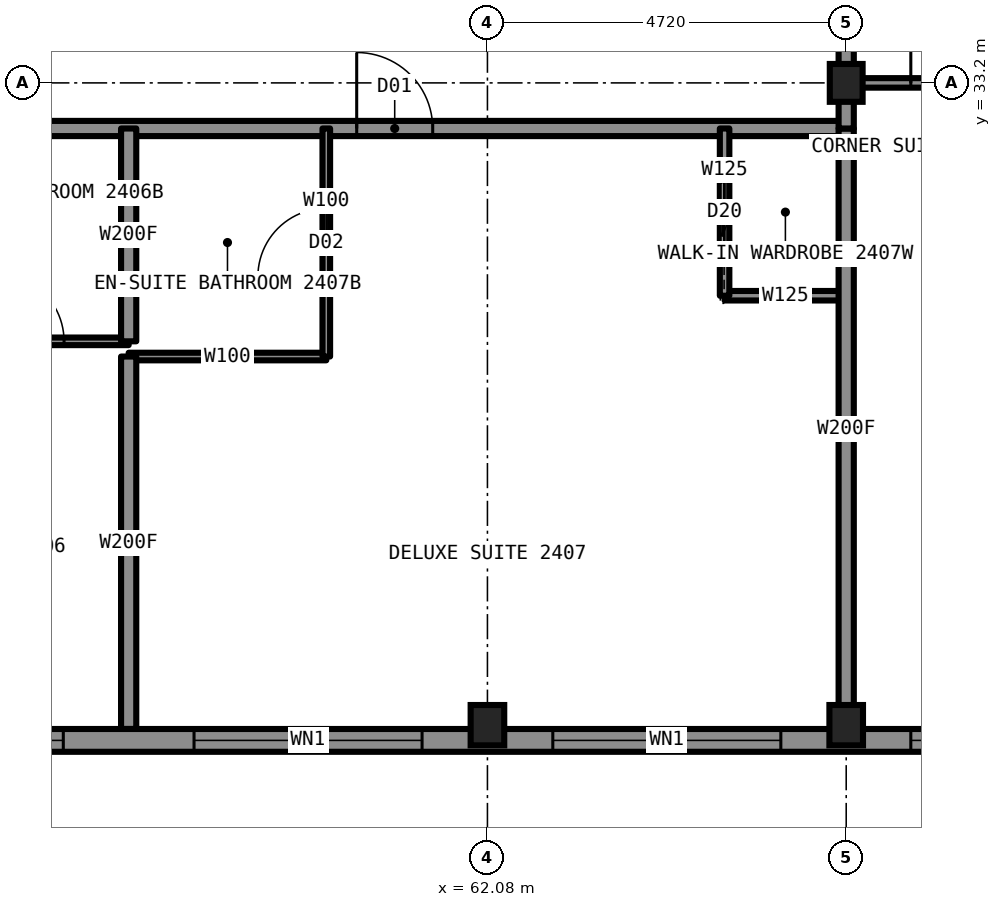
"""IFC4 building model, lengths in metres.
Left out: names, types, materials, properties, quantities, classifications, styles, units other than length and angle.
Written with IfcOpenShell. Run it as: python <this file> out.ifc"""

import sys

from ifc_helpers import new_model, si_unit, direction, frame, frame_2d, origin, origin_2d, place, context, subcontext, project, spatial, rectangle, i_section, extrude, element, fill, save


model = new_model("IFC4")
c1 = context("Model", 3, precision=1e-05, world=origin(), true_north=direction((0.0, 1.0)))
c2 = subcontext(c1, "Body", "Model", "MODEL_VIEW")
j1 = project(units=[si_unit("LENGTHUNIT", "METRE"), si_unit("PLANEANGLEUNIT", "RADIAN")], contexts=[c1])
p1 = place(None, origin())
s1 = spatial("IfcSite", under=j1, at=p1, CompositionType="ELEMENT")
p2 = place(p1, origin())
s2 = spatial("IfcBuilding", under=s1, at=p2, CompositionType="ELEMENT")
p3 = place(p2, frame((0.0, 0.0, 93.4)))
s3 = spatial("IfcBuildingStorey", under=s2, at=p3, CompositionType="ELEMENT", Elevation=93.4)
for number, where, z_axis, x_axis in (
    (1, (62.08, 24.75, 0.0), (0.0, 0.0, 1.0), (1.0, 0.0, 0.0)),
    (2, (66.8, 24.75, 0.0), (0.0, 0.0, 1.0), (1.0, 0.0, 0.0)),
):
    element("IfcColumn", number, at=place(p3, frame(where, z_axis=z_axis, x_axis=x_axis)), inside=s3, PredefinedType="COLUMN", context=c2, shape_type="SweptSolid", body=[
        extrude(i_section(OverallWidth=0.442, OverallDepth=0.531, WebThickness=0.066, FlangeThickness=0.106, at=origin_2d()), origin(), (0.0, 0.0, 1.0), 3.5),
    ])
p4 = place(p3, frame((66.8, 33.2, 0.0), z_axis=(0.0, 0.0, 1.0), x_axis=(1.0, 0.0, 0.0)))
e3 = element("IfcColumn", 3, at=p4, inside=s3, PredefinedType="COLUMN", context=c2, shape_type="SweptSolid", body=[
    extrude(i_section(OverallWidth=0.432, OverallDepth=0.498, WebThickness=0.056, FlangeThickness=0.089, at=origin_2d()), origin(), (0.0, 0.0, 1.0), 3.5),
])
p5 = place(p3, frame((66.8, 33.2, 0.0), z_axis=(0.0, 0.0, 1.0), x_axis=(1.0, 0.0, 0.0)))
e4 = element("IfcWall", 4, at=p5, inside=s3, PredefinedType="PARTITIONING", context=c2, shape_type="SweptSolid", body=[
    extrude(rectangle(XDim=8.5, YDim=0.125, at=frame_2d((4.25, 0.0))), origin(), (0.0, 0.0, 1.0), 2.573),
])
p6 = place(p5, frame((0.85, 0.0, 0.0)))
e5 = element("IfcOpeningElement", 5, at=p6, cuts=e4, PredefinedType="OPENING", context=c2, shape_type="SweptSolid", body=[
    extrude(rectangle(XDim=0.9, YDim=2.2, at=frame_2d((0.45, 1.1))), frame((0.0, 0.073, 0.0), z_axis=(0.0, -1.0, 0.0), x_axis=(1.0, 0.0, 0.0)), (0.0, 0.0, 1.0), 0.145),
])
p7 = place(p3, frame((43.2, 32.6, 0.0), z_axis=(0.0, 0.0, 1.0), x_axis=(1.0, 0.0, 0.0)))
e6 = element("IfcWall", 6, at=p7, inside=s3, PredefinedType="PARTITIONING", context=c2, shape_type="SweptSolid", body=[
    extrude(rectangle(XDim=23.6, YDim=0.2, at=frame_2d((11.8, 0.0))), origin(), (0.0, 0.0, 1.0), 3.33),
])
p8 = place(p7, frame((3.0, 0.0, 0.0)))
e7 = element("IfcOpeningElement", 7, at=p8, cuts=e6, PredefinedType="OPENING", context=c2, shape_type="SweptSolid", body=[
    extrude(rectangle(XDim=1.0, YDim=2.2, at=frame_2d((0.5, 1.1))), frame((0.0, 0.11, 0.0), z_axis=(0.0, -1.0, 0.0), x_axis=(1.0, 0.0, 0.0)), (0.0, 0.0, 1.0), 0.22),
])
p9 = place(p7, frame((9.84, 0.0, 0.0)))
e8 = element("IfcOpeningElement", 8, at=p9, cuts=e6, PredefinedType="OPENING", context=c2, shape_type="SweptSolid", body=[
    extrude(rectangle(XDim=1.0, YDim=2.2, at=frame_2d((0.5, 1.1))), frame((0.0, 0.11, 0.0), z_axis=(0.0, -1.0, 0.0), x_axis=(1.0, 0.0, 0.0)), (0.0, 0.0, 1.0), 0.22),
])
p10 = place(p7, frame((17.16, 0.0, 0.0)))
e9 = element("IfcOpeningElement", 9, at=p10, cuts=e6, PredefinedType="OPENING", context=c2, shape_type="SweptSolid", body=[
    extrude(rectangle(XDim=1.0, YDim=2.2, at=frame_2d((0.5, 1.1))), frame((0.0, 0.11, 0.0), z_axis=(0.0, -1.0, 0.0), x_axis=(1.0, 0.0, 0.0)), (0.0, 0.0, 1.0), 0.22),
])
p11 = place(p3, frame((65.2, 30.4, 0.0), z_axis=(0.0, 0.0, 1.0), x_axis=(1.0, 0.0, 0.0)))
e10 = element("IfcWall", 10, at=p11, inside=s3, PredefinedType="PARTITIONING", context=c2, shape_type="SweptSolid", body=[
    extrude(rectangle(XDim=1.6, YDim=0.125, at=frame_2d((0.8, 0.0))), origin(), (0.0, 0.0, 1.0), 3.33),
])
p12 = place(p3, frame((54.76, 29.8, 0.0), z_axis=(0.0, 0.0, 1.0), x_axis=(1.0, 0.0, 0.0)))
e11 = element("IfcWall", 11, at=p12, inside=s3, PredefinedType="PARTITIONING", context=c2, shape_type="SweptSolid", body=[
    extrude(rectangle(XDim=2.6, YDim=0.1, at=frame_2d((1.3, 0.0))), origin(), (0.0, 0.0, 1.0), 2.731),
])
p13 = place(p12, frame((0.85, 0.0, 0.0)))
e12 = element("IfcOpeningElement", 12, at=p13, cuts=e11, PredefinedType="OPENING", context=c2, shape_type="SweptSolid", body=[
    extrude(rectangle(XDim=0.9, YDim=2.1, at=frame_2d((0.45, 1.05))), frame((0.0, 0.06, 0.0), z_axis=(0.0, -1.0, 0.0), x_axis=(1.0, 0.0, 0.0)), (0.0, 0.0, 1.0), 0.12),
])
p14 = place(p3, frame((57.36, 29.6, 0.0), z_axis=(0.0, 0.0, 1.0), x_axis=(1.0, 0.0, 0.0)))
e13 = element("IfcWall", 13, at=p14, inside=s3, PredefinedType="PARTITIONING", context=c2, shape_type="SweptSolid", body=[
    extrude(rectangle(XDim=2.6, YDim=0.1, at=frame_2d((1.3, 0.0))), origin(), (0.0, 0.0, 1.0), 3.33),
])
p15 = place(p3, frame((65.2, 30.4, 0.0), z_axis=(0.0, 0.0, 1.0), x_axis=(0.0, 1.0, 0.0)))
e14 = element("IfcWall", 14, at=p15, inside=s3, PredefinedType="PARTITIONING", context=c2, shape_type="SweptSolid", body=[
    extrude(rectangle(XDim=2.2, YDim=0.125, at=frame_2d((1.1, 0.0))), origin(), (0.0, 0.0, 1.0), 3.33),
])
p16 = place(p15, frame((0.7, 0.0, 0.0)))
e15 = element("IfcOpeningElement", 15, at=p16, cuts=e14, PredefinedType="OPENING", context=c2, shape_type="SweptSolid", body=[
    extrude(rectangle(XDim=0.8, YDim=2.1, at=frame_2d((0.4, 1.05))), frame((0.0, 0.073, 0.0), z_axis=(0.0, -1.0, 0.0), x_axis=(1.0, 0.0, 0.0)), (0.0, 0.0, 1.0), 0.145),
])
p17 = place(p3, frame((66.8, 33.22, 0.0), z_axis=(0.0, 0.0, 1.0), x_axis=(0.0, 1.0, 0.0)))
e16 = element("IfcWall", 16, at=p17, inside=s3, PredefinedType="PARTITIONING", context=c2, shape_type="SweptSolid", body=[
    extrude(rectangle(XDim=23.56, YDim=0.2, at=frame_2d((11.78, 0.0))), origin(), (0.0, 0.0, 1.0), 3.33),
])
p18 = place(p17, frame((6.16, 0.0, 0.0)))
e17 = element("IfcOpeningElement", 17, at=p18, cuts=e16, PredefinedType="OPENING", context=c2, shape_type="SweptSolid", body=[
    extrude(rectangle(XDim=1.0, YDim=2.2, at=frame_2d((0.5, 1.1))), frame((0.0, 0.11, 0.0), z_axis=(0.0, -1.0, 0.0), x_axis=(1.0, 0.0, 0.0)), (0.0, 0.0, 1.0), 0.22),
])
p19 = place(p17, frame((12.42, 0.0, 0.0)))
e18 = element("IfcOpeningElement", 18, at=p19, cuts=e16, PredefinedType="OPENING", context=c2, shape_type="SweptSolid", body=[
    extrude(rectangle(XDim=1.0, YDim=2.2, at=frame_2d((0.5, 1.1))), frame((0.0, 0.11, 0.0), z_axis=(0.0, -1.0, 0.0), x_axis=(1.0, 0.0, 0.0)), (0.0, 0.0, 1.0), 0.22),
])
p20 = place(p17, frame((21.82, 0.0, 0.0)))
e19 = element("IfcOpeningElement", 19, at=p20, cuts=e16, PredefinedType="OPENING", context=c2, shape_type="SweptSolid", body=[
    extrude(rectangle(XDim=1.1, YDim=2.2, at=frame_2d((0.55, 1.1))), frame((0.0, 0.11, 0.0), z_axis=(0.0, -1.0, 0.0), x_axis=(1.0, 0.0, 0.0)), (0.0, 0.0, 1.0), 0.22),
])
p21 = place(p17, frame((0.64, 0.0, 0.0)))
e20 = element("IfcOpeningElement", 20, at=p21, cuts=e16, PredefinedType="OPENING", context=c2, shape_type="SweptSolid", body=[
    extrude(rectangle(XDim=1.1, YDim=2.2, at=frame_2d((0.55, 1.1))), frame((0.0, 0.11, 0.0), z_axis=(0.0, -1.0, 0.0), x_axis=(1.0, 0.0, 0.0)), (0.0, 0.0, 1.0), 0.22),
])
p22 = place(p3, frame((66.8, 24.7, 0.0), z_axis=(0.0, 0.0, 1.0), x_axis=(0.0, 1.0, 0.0)))
e21 = element("IfcWall", 21, at=p22, inside=s3, PredefinedType="PARTITIONING", context=c2, shape_type="SweptSolid", body=[
    extrude(rectangle(XDim=7.9, YDim=0.2, at=frame_2d((3.95, 0.0))), origin(), (0.0, 0.0, 1.0), 2.573),
])
p23 = place(p3, frame((57.36, 24.7, 0.0), z_axis=(0.0, 0.0, 1.0), x_axis=(0.0, 1.0, 0.0)))
e22 = element("IfcWall", 22, at=p23, inside=s3, PredefinedType="PARTITIONING", context=c2, shape_type="SweptSolid", body=[
    extrude(rectangle(XDim=4.9, YDim=0.2, at=frame_2d((2.45, 0.0))), origin(), (0.0, 0.0, 1.0), 3.33),
])
p24 = place(p3, frame((57.36, 29.8, 0.0), z_axis=(0.0, 0.0, 1.0), x_axis=(0.0, 1.0, 0.0)))
e23 = element("IfcWall", 23, at=p24, inside=s3, PredefinedType="PARTITIONING", context=c2, shape_type="SweptSolid", body=[
    extrude(rectangle(XDim=2.8, YDim=0.2, at=frame_2d((1.4, 0.0))), origin(), (0.0, 0.0, 1.0), 3.33),
])
p25 = place(p3, frame((59.96, 29.6, 0.0), z_axis=(0.0, 0.0, 1.0), x_axis=(0.0, 1.0, 0.0)))
e24 = element("IfcWall", 24, at=p25, inside=s3, PredefinedType="PARTITIONING", context=c2, shape_type="SweptSolid", body=[
    extrude(rectangle(XDim=3.0, YDim=0.1, at=frame_2d((1.5, 0.0))), origin(), (0.0, 0.0, 1.0), 3.33),
])
p26 = place(p25, frame((1.05, 0.0, 0.0)))
e25 = element("IfcOpeningElement", 25, at=p26, cuts=e24, PredefinedType="OPENING", context=c2, shape_type="SweptSolid", body=[
    extrude(rectangle(XDim=0.9, YDim=2.1, at=frame_2d((0.45, 1.05))), frame((0.0, 0.06, 0.0), z_axis=(0.0, -1.0, 0.0), x_axis=(1.0, 0.0, 0.0)), (0.0, 0.0, 1.0), 0.12),
])
p27 = place(p3, frame((39.9, 24.55, 0.0), z_axis=(0.0, 0.0, 1.0), x_axis=(1.0, 0.0, 0.0)))
e26 = element("IfcWall", 26, at=p27, inside=s3, PredefinedType="SOLIDWALL", context=c2, shape_type="SweptSolid", body=[
    extrude(rectangle(XDim=30.2, YDim=0.3, at=frame_2d((15.1, 0.0))), origin(), (0.0, 0.0, 1.0), 2.83),
])
p28 = place(p27, frame((0.85, 0.0, 0.5)))
e27 = element("IfcOpeningElement", 27, at=p28, cuts=e26, PredefinedType="OPENING", context=c2, shape_type="SweptSolid", body=[
    extrude(rectangle(XDim=1.6, YDim=2.0, at=frame_2d((0.8, 1.0))), frame((0.0, 0.16, 0.0), z_axis=(0.0, -1.0, 0.0), x_axis=(1.0, 0.0, 0.0)), (0.0, 0.0, 1.0), 0.32),
])
p29 = place(p27, frame((4.16, 0.0, 0.5)))
e28 = element("IfcOpeningElement", 28, at=p29, cuts=e26, PredefinedType="OPENING", context=c2, shape_type="SweptSolid", body=[
    extrude(rectangle(XDim=3.0, YDim=2.0, at=frame_2d((1.5, 1.0))), frame((0.0, 0.16, 0.0), z_axis=(0.0, -1.0, 0.0), x_axis=(1.0, 0.0, 0.0)), (0.0, 0.0, 1.0), 0.32),
])
p30 = place(p27, frame((8.88, 0.0, 0.5)))
e29 = element("IfcOpeningElement", 29, at=p30, cuts=e26, PredefinedType="OPENING", context=c2, shape_type="SweptSolid", body=[
    extrude(rectangle(XDim=3.0, YDim=2.0, at=frame_2d((1.5, 1.0))), frame((0.0, 0.16, 0.0), z_axis=(0.0, -1.0, 0.0), x_axis=(1.0, 0.0, 0.0)), (0.0, 0.0, 1.0), 0.32),
])
p31 = place(p27, frame((13.6, 0.0, 0.5)))
e30 = element("IfcOpeningElement", 30, at=p31, cuts=e26, PredefinedType="OPENING", context=c2, shape_type="SweptSolid", body=[
    extrude(rectangle(XDim=3.0, YDim=2.0, at=frame_2d((1.5, 1.0))), frame((0.0, 0.16, 0.0), z_axis=(0.0, -1.0, 0.0), x_axis=(1.0, 0.0, 0.0)), (0.0, 0.0, 1.0), 0.32),
])
p32 = place(p27, frame((18.32, 0.0, 0.5)))
e31 = element("IfcOpeningElement", 31, at=p32, cuts=e26, PredefinedType="OPENING", context=c2, shape_type="SweptSolid", body=[
    extrude(rectangle(XDim=3.0, YDim=2.0, at=frame_2d((1.5, 1.0))), frame((0.0, 0.16, 0.0), z_axis=(0.0, -1.0, 0.0), x_axis=(1.0, 0.0, 0.0)), (0.0, 0.0, 1.0), 0.32),
])
p33 = place(p27, frame((23.04, 0.0, 0.5)))
e32 = element("IfcOpeningElement", 32, at=p33, cuts=e26, PredefinedType="OPENING", context=c2, shape_type="SweptSolid", body=[
    extrude(rectangle(XDim=3.0, YDim=2.0, at=frame_2d((1.5, 1.0))), frame((0.0, 0.16, 0.0), z_axis=(0.0, -1.0, 0.0), x_axis=(1.0, 0.0, 0.0)), (0.0, 0.0, 1.0), 0.32),
])
p34 = place(p27, frame((27.75, 0.0, 0.5)))
e33 = element("IfcOpeningElement", 33, at=p34, cuts=e26, PredefinedType="OPENING", context=c2, shape_type="SweptSolid", body=[
    extrude(rectangle(XDim=1.6, YDim=2.0, at=frame_2d((0.8, 1.0))), frame((0.0, 0.16, 0.0), z_axis=(0.0, -1.0, 0.0), x_axis=(1.0, 0.0, 0.0)), (0.0, 0.0, 1.0), 0.32),
])
p35 = place(p3, frame((66.8, 32.6, 0.0), z_axis=(0.0, 0.0, 1.0), x_axis=(0.0, 1.0, 0.0)))
e34 = element("IfcWall", 34, at=p35, inside=s3, PredefinedType="PARTITIONING", context=c2, shape_type="SweptSolid", body=[
    extrude(rectangle(XDim=0.62, YDim=0.2, at=frame_2d((0.31, 0.0))), origin(), (0.0, 0.0, 1.0), 2.573),
])
p36 = place(p13, origin())
e35 = element("IfcDoor", 35, at=p36, inside=s3, OperationType="SINGLE_SWING_RIGHT", PredefinedType="DOOR", context=c2, shape_type="SweptSolid", body=[
    extrude(rectangle(XDim=0.9, YDim=2.1, at=frame_2d((0.45, 1.05))), frame((0.0, 0.025, 0.0), z_axis=(0.0, -1.0, 0.0), x_axis=(1.0, 0.0, 0.0)), (0.0, 0.0, 1.0), 0.05),
])
fill(e12, e35)
p37 = place(p10, origin())
e36 = element("IfcDoor", 36, at=p37, inside=s3, OperationType="SINGLE_SWING_LEFT", PredefinedType="DOOR", context=c2, shape_type="SweptSolid", body=[
    extrude(rectangle(XDim=1.0, YDim=2.2, at=frame_2d((0.5, 1.1))), frame((0.0, 0.025, 0.0), z_axis=(0.0, -1.0, 0.0), x_axis=(1.0, 0.0, 0.0)), (0.0, 0.0, 1.0), 0.05),
])
fill(e9, e36)
p38 = place(p26, origin())
e37 = element("IfcDoor", 37, at=p38, inside=s3, OperationType="SINGLE_SWING_RIGHT", PredefinedType="DOOR", context=c2, shape_type="SweptSolid", body=[
    extrude(rectangle(XDim=0.9, YDim=2.1, at=frame_2d((0.45, 1.05))), frame((0.0, 0.025, 0.0), z_axis=(0.0, -1.0, 0.0), x_axis=(1.0, 0.0, 0.0)), (0.0, 0.0, 1.0), 0.05),
])
fill(e25, e37)
p39 = place(p16, origin())
e38 = element("IfcDoor", 38, at=p39, inside=s3, OperationType="SLIDING_TO_LEFT", PredefinedType="DOOR", context=c2, shape_type="SweptSolid", body=[
    extrude(rectangle(XDim=0.8, YDim=2.1, at=frame_2d((0.4, 1.05))), frame((0.0, 0.025, 0.0), z_axis=(0.0, -1.0, 0.0), x_axis=(1.0, 0.0, 0.0)), (0.0, 0.0, 1.0), 0.05),
])
fill(e15, e38)
p40 = place(p6, origin())
e39 = element("IfcDoor", 39, at=p40, inside=s3, OperationType="SINGLE_SWING_LEFT", PredefinedType="DOOR", context=c2, shape_type="SweptSolid", body=[
    extrude(rectangle(XDim=0.9, YDim=2.2, at=frame_2d((0.45, 1.1))), frame((0.0, 0.025, 0.0), z_axis=(0.0, -1.0, 0.0), x_axis=(1.0, 0.0, 0.0)), (0.0, 0.0, 1.0), 0.05),
])
fill(e5, e39)
p41 = place(p31, origin())
e40 = element("IfcWindow", 40, at=p41, inside=s3, PartitioningType="SINGLE_PANEL", PredefinedType="WINDOW", context=c2, shape_type="SweptSolid", body=[
    extrude(rectangle(XDim=3.0, YDim=2.0, at=frame_2d((1.5, 1.0))), frame((0.0, 0.03, 0.0), z_axis=(0.0, -1.0, 0.0), x_axis=(1.0, 0.0, 0.0)), (0.0, 0.0, 1.0), 0.06),
])
fill(e30, e40)
p42 = place(p32, origin())
e41 = element("IfcWindow", 41, at=p42, inside=s3, PartitioningType="SINGLE_PANEL", PredefinedType="WINDOW", context=c2, shape_type="SweptSolid", body=[
    extrude(rectangle(XDim=3.0, YDim=2.0, at=frame_2d((1.5, 1.0))), frame((0.0, 0.03, 0.0), z_axis=(0.0, -1.0, 0.0), x_axis=(1.0, 0.0, 0.0)), (0.0, 0.0, 1.0), 0.06),
])
fill(e31, e41)
p43 = place(p33, origin())
e42 = element("IfcWindow", 42, at=p43, inside=s3, PartitioningType="SINGLE_PANEL", PredefinedType="WINDOW", context=c2, shape_type="SweptSolid", body=[
    extrude(rectangle(XDim=3.0, YDim=2.0, at=frame_2d((1.5, 1.0))), frame((0.0, 0.03, 0.0), z_axis=(0.0, -1.0, 0.0), x_axis=(1.0, 0.0, 0.0)), (0.0, 0.0, 1.0), 0.06),
])
fill(e32, e42)
p44 = place(p34, origin())
e43 = element("IfcWindow", 43, at=p44, inside=s3, PartitioningType="SINGLE_PANEL", PredefinedType="WINDOW", context=c2, shape_type="SweptSolid", body=[
    extrude(rectangle(XDim=1.6, YDim=2.0, at=frame_2d((0.8, 1.0))), frame((0.0, 0.03, 0.0), z_axis=(0.0, -1.0, 0.0), x_axis=(1.0, 0.0, 0.0)), (0.0, 0.0, 1.0), 0.06),
])
fill(e33, e43)
save(model, sys.argv[1])
